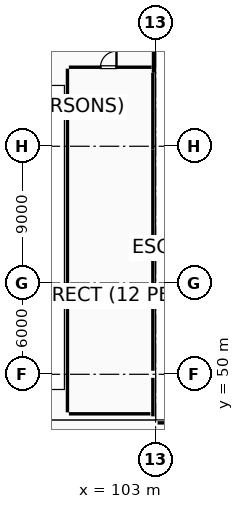
"""IFC4 building model, lengths in metres.
Left out: names, types, materials, properties, quantities, classifications, styles, units other than length and angle.
Written with IfcOpenShell. Run it as: python <this file> out.ifc"""

import sys

from ifc_helpers import new_model, si_unit, direction, frame, frame_2d, origin, origin_2d, place, context, subcontext, project, spatial, rectangle, hollow_rectangle, i_section, extrude, element, fill, save


model = new_model("IFC4")
c1 = context("Model", 3, precision=1e-05, world=origin(), true_north=direction((0.0, 1.0)))
c2 = subcontext(c1, "Body", "Model", "MODEL_VIEW")
j1 = project(units=[si_unit("LENGTHUNIT", "METRE"), si_unit("PLANEANGLEUNIT", "RADIAN")], contexts=[c1])
p1 = place(None, origin())
s1 = spatial("IfcSite", under=j1, at=p1, CompositionType="ELEMENT")
p2 = place(p1, origin())
s2 = spatial("IfcBuilding", under=s1, at=p2, CompositionType="ELEMENT")
p3 = place(p2, frame((0.0, 0.0, 19.8)))
s3 = spatial("IfcBuildingStorey", under=s2, at=p3, CompositionType="ELEMENT", Elevation=19.8)
p4 = place(p3, frame((103.0, 50.0, 0.0), z_axis=(0.0, 0.0, 1.0), x_axis=(1.0, 0.0, 0.0)))
e1 = element("IfcColumn", 1, at=p4, inside=s3, PredefinedType="COLUMN", context=c2, shape_type="SweptSolid", body=[
    extrude(hollow_rectangle(XDim=0.45, YDim=0.45, WallThickness=0.02, at=origin_2d()), origin(), (0.0, 0.0, 1.0), 4.5),
])
for number, where, z_axis, x_axis in (
    (2, (103.0, 56.0, 0.0), (0.0, 0.0, 1.0), (1.0, 0.0, 0.0)),
    (3, (103.0, 65.0, 0.0), (0.0, 0.0, 1.0), (1.0, 0.0, 0.0)),
    (4, (103.0, 47.0, 0.0), (0.0, 0.0, 1.0), (1.0, 0.0, 0.0)),
):
    element("IfcColumn", number, at=place(p3, frame(where, z_axis=z_axis, x_axis=x_axis)), inside=s3, PredefinedType="COLUMN", context=c2, shape_type="SweptSolid", body=[
        extrude(i_section(OverallWidth=0.25, OverallDepth=0.45, WebThickness=0.011, FlangeThickness=0.014, FilletRadius=0.015, at=origin_2d()), origin(), (0.0, 0.0, 1.0), 4.5),
    ])
p5 = place(p3, frame((102.86, 73.767, 0.0), z_axis=(0.0, 0.0, 1.0), x_axis=(0.0, -1.0, 0.0)))
e5 = element("IfcWall", 5, at=p5, inside=s3, PredefinedType="ELEMENTEDWALL", context=c2, shape_type="SweptSolid", body=[
    extrude(rectangle(XDim=3.933, YDim=0.24, at=frame_2d((1.967, 0.0))), origin(), (0.0, 0.0, 1.0), 3.235),
])
p6 = place(p3, frame((102.82, 69.83, 0.0), z_axis=(0.0, 0.0, 1.0), x_axis=(0.0, -1.0, 0.0)))
e6 = element("IfcWall", 6, at=p6, inside=s3, PredefinedType="STANDARD", context=c2, shape_type="SweptSolid", body=[
    extrude(rectangle(XDim=5.063, YDim=0.32, at=frame_2d((2.531, 0.0))), origin(), (0.0, 0.0, 1.0), 3.235),
])
p7 = place(p3, frame((102.82, 64.767, 0.0), z_axis=(0.0, 0.0, 1.0), x_axis=(0.0, -1.0, 0.0)))
e7 = element("IfcWall", 7, at=p7, inside=s3, PredefinedType="STANDARD", context=c2, shape_type="SweptSolid", body=[
    extrude(rectangle(XDim=9.0, YDim=0.32, at=frame_2d((4.5, 0.0))), origin(), (0.0, 0.0, 1.0), 3.785),
])
p8 = place(p3, frame((102.82, 55.767, 0.0), z_axis=(0.0, 0.0, 1.0), x_axis=(0.0, -1.0, 0.0)))
e8 = element("IfcWall", 8, at=p8, inside=s3, PredefinedType="STANDARD", context=c2, shape_type="SweptSolid", body=[
    extrude(rectangle(XDim=5.534, YDim=0.32, at=frame_2d((2.767, 0.0))), origin(), (0.0, 0.0, 1.0), 3.735),
])
p9 = place(p3, frame((102.82, 49.767, 0.0), z_axis=(0.0, 0.0, 1.0), x_axis=(0.0, -1.0, 0.0)))
e9 = element("IfcWall", 9, at=p9, inside=s3, PredefinedType="STANDARD", context=c2, shape_type="SweptSolid", body=[
    extrude(rectangle(XDim=2.534, YDim=0.32, at=frame_2d((1.267, 0.0))), origin(), (0.0, 0.0, 1.0), 3.685),
])
p10 = place(p3, frame((103.129, 46.805, 0.0), z_axis=(0.0, 0.0, 1.0), x_axis=(1.0, 0.0, 0.0)))
e10 = element("IfcWall", 10, at=p10, inside=s3, PredefinedType="STANDARD", context=c2, shape_type="SweptSolid", body=[
    extrude(rectangle(XDim=15.286, YDim=0.35, at=frame_2d((7.643, 0.0))), origin(), (0.0, 0.0, 1.0), 1.25),
])
p11 = place(p3, frame((97.295, 70.2, 0.0), z_axis=(0.0, 0.0, 1.0), x_axis=(1.0, 0.0, 0.0)))
e11 = element("IfcWall", 11, at=p11, inside=s3, PredefinedType="PARTITIONING", context=c2, shape_type="SweptSolid", body=[
    extrude(rectangle(XDim=5.441, YDim=0.15, at=frame_2d((2.721, 0.0))), origin(), (0.0, 0.0, 1.0), 4.24),
])
p12 = place(p11, frame((2.08, 0.0, 0.0)))
e12 = element("IfcOpeningElement", 12, at=p12, cuts=e11, PredefinedType="OPENING", context=c2, shape_type="SweptSolid", body=[
    extrude(rectangle(XDim=1.05, YDim=2.15, at=frame_2d((0.525, 1.075))), frame((0.0, 0.085, 0.0), z_axis=(0.0, -1.0, 0.0), x_axis=(1.0, 0.0, 0.0)), (0.0, 0.0, 1.0), 0.17),
])
p13 = place(p3, frame((102.656, 47.4, 0.0), z_axis=(0.0, 0.0, 1.0), x_axis=(-1.0, 0.0, 0.0)))
e13 = element("IfcWall", 13, at=p13, inside=s3, PredefinedType="PARTITIONING", context=c2, shape_type="SweptSolid", body=[
    extrude(rectangle(XDim=5.361, YDim=0.15, at=frame_2d((2.681, 0.0))), origin(), (0.0, 0.0, 1.0), 4.24),
])
p14 = place(p3, frame((97.2, 47.495, 0.0), z_axis=(0.0, 0.0, 1.0), x_axis=(0.0, 1.0, 0.0)))
e14 = element("IfcWall", 14, at=p14, inside=s3, PredefinedType="PARTITIONING", context=c2, shape_type="SweptSolid", body=[
    extrude(rectangle(XDim=22.61, YDim=0.15, at=frame_2d((11.305, 0.0))), origin(), (0.0, 0.0, 1.0), 4.24),
])
p15 = place(p12, origin())
e15 = element("IfcDoor", 15, at=p15, inside=s3, OperationType="SINGLE_SWING_RIGHT", PredefinedType="DOOR", context=c2, shape_type="SweptSolid", body=[
    extrude(rectangle(XDim=1.05, YDim=2.15, at=frame_2d((0.525, 1.075))), frame((0.0, 0.025, 0.0), z_axis=(0.0, -1.0, 0.0), x_axis=(1.0, 0.0, 0.0)), (0.0, 0.0, 1.0), 0.05),
])
fill(e12, e15)
save(model, sys.argv[1])
